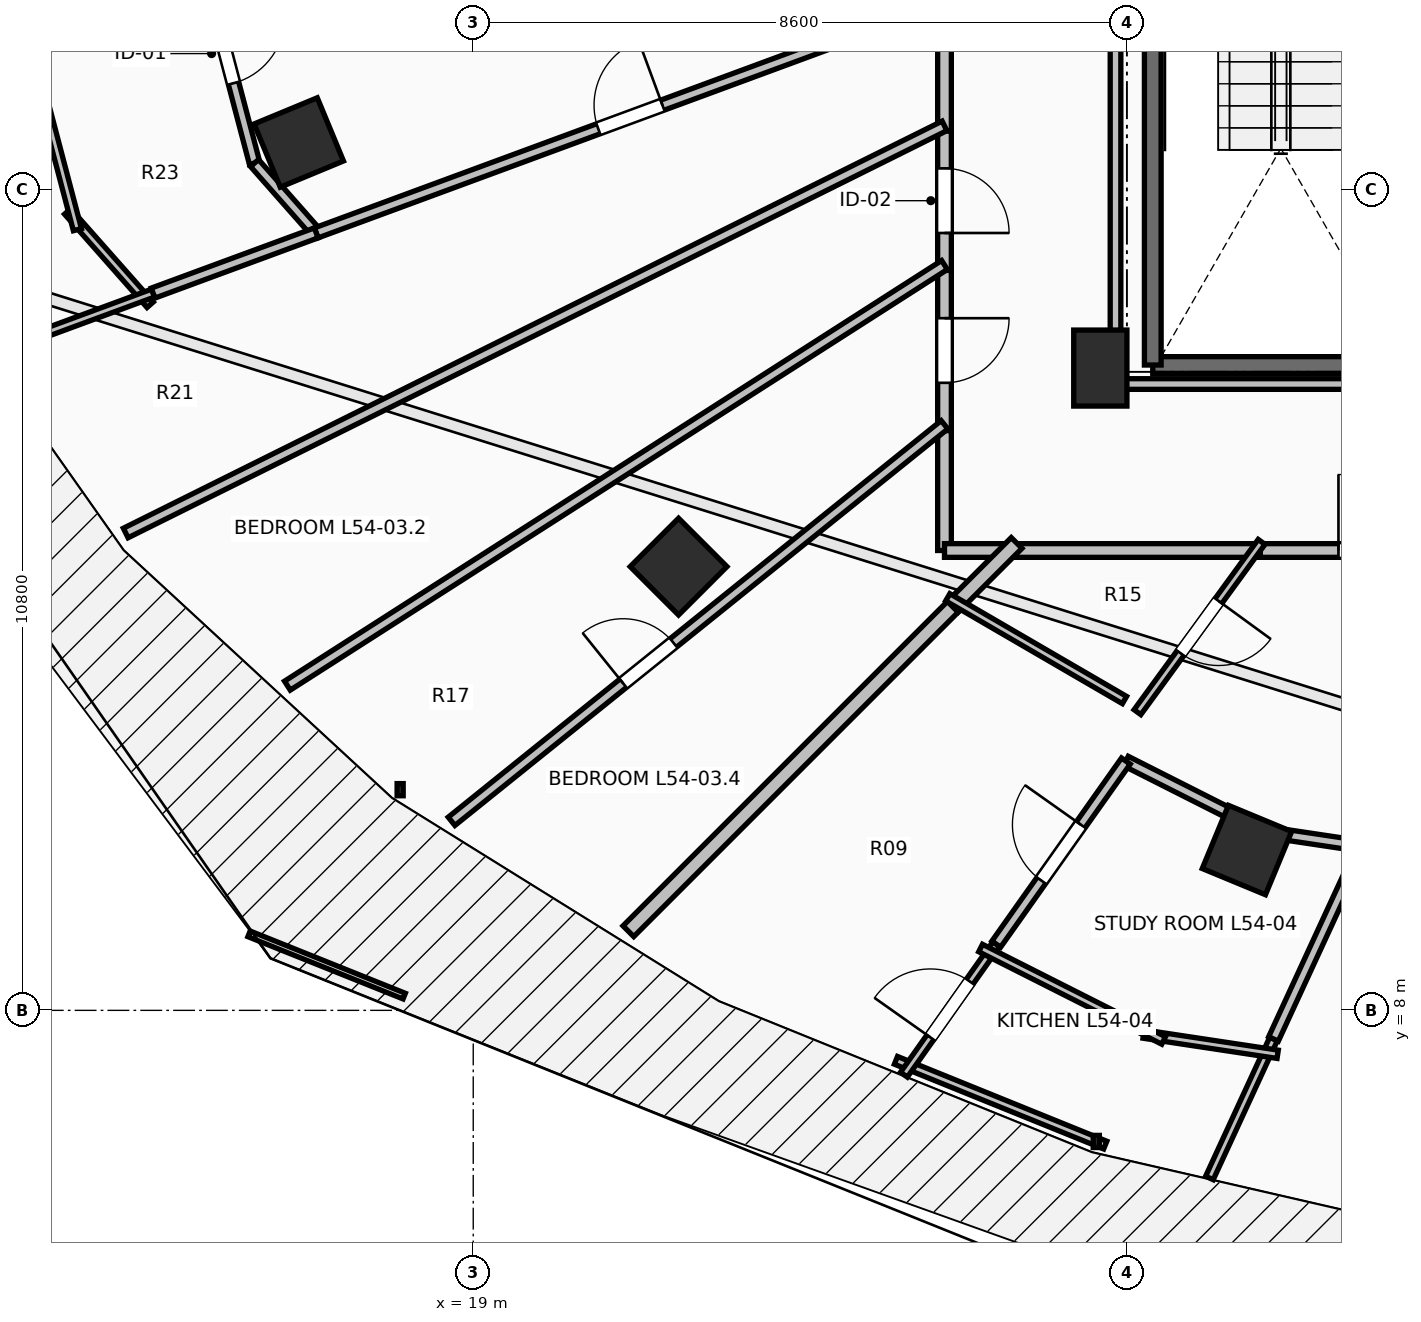
"""IFC4 building model, lengths in metres.
Left out: names, types, materials, properties, quantities, classifications, styles, units other than length and angle.
Written with IfcOpenShell. Run it as: python <this file> out.ifc"""

import sys

from ifc_helpers import new_model, si_unit, direction, frame, frame_2d, origin, origin_2d, place, context, subcontext, project, spatial, rectangle, extrude, element, fill, save


model = new_model("IFC4")
c1 = context("Model", 3, precision=1e-05, world=origin(), true_north=direction((0.0, 1.0)))
c2 = subcontext(c1, "Body", "Model", "MODEL_VIEW")
j1 = project(units=[si_unit("LENGTHUNIT", "METRE"), si_unit("PLANEANGLEUNIT", "RADIAN")], contexts=[c1])
p1 = place(None, origin())
s1 = spatial("IfcSite", under=j1, at=p1, CompositionType="ELEMENT")
p2 = place(p1, origin())
s2 = spatial("IfcBuilding", under=s1, at=p2, CompositionType="ELEMENT")
p3 = place(p2, frame((0.0, 0.0, 200.1)))
s3 = spatial("IfcBuildingStorey", under=s2, at=p3, CompositionType="ELEMENT", Elevation=200.1)
for number, where, z_axis, x_axis in (
    (1, (16.705, 19.418, 0.0), (0.0, 0.0, 1.0), (-0.924, -0.383, 0.0)),
    (2, (21.701, 13.838, 0.0), (0.0, 0.0, 1.0), (-0.707, -0.707, 0.0)),
    (3, (29.179, 10.109, 0.0), (0.0, 0.0, 1.0), (-0.383, -0.924, 0.0)),
):
    element("IfcColumn", number, at=place(p3, frame(where, z_axis=z_axis, x_axis=x_axis)), inside=s3, PredefinedType="COLUMN", context=c2, shape_type="SweptSolid", body=[
        extrude(rectangle(XDim=0.9, YDim=0.9, at=origin_2d()), origin(), (0.0, 0.0, 1.0), 3.55),
    ])
p4 = place(p3, frame((27.25, 16.45, 0.0), z_axis=(0.0, 0.0, 1.0), x_axis=(1.0, 0.0, 0.0)))
e4 = element("IfcColumn", 4, at=p4, inside=s3, PredefinedType="PILASTER", context=c2, shape_type="SweptSolid", body=[
    extrude(rectangle(XDim=0.7, YDim=1.0, at=origin_2d()), origin(), (0.0, 0.0, 1.0), 3.55),
])
p5 = place(p3, frame((31.31, 16.49, 0.0), z_axis=(0.0, 0.0, 1.0), x_axis=(-1.0, 0.0, 0.0)))
e5 = element("IfcWall", 5, at=p5, inside=s3, PredefinedType="SOLIDWALL", context=c2, shape_type="SweptSolid", body=[
    extrude(rectangle(XDim=3.37, YDim=0.22, at=frame_2d((1.685, 0.0))), origin(), (0.0, 0.0, 1.0), 3.29),
])
p6 = place(p3, frame((27.94, 16.49, 0.0), z_axis=(0.0, 0.0, 1.0), x_axis=(0.0, 1.0, 0.0)))
e6 = element("IfcWall", 6, at=p6, inside=s3, PredefinedType="SOLIDWALL", context=c2, shape_type="SweptSolid", body=[
    extrude(rectangle(XDim=7.42, YDim=0.22, at=frame_2d((3.71, 0.0))), origin(), (0.0, 0.0, 1.0), 3.29),
])
p7 = place(p3, frame((25.2, 21.214, 0.0), z_axis=(0.0, 0.0, 1.0), x_axis=(0.0, -1.0, 0.0)))
e7 = element("IfcWall", 7, at=p7, inside=s3, PredefinedType="PARTITIONING", context=c2, shape_type="SweptSolid", body=[
    extrude(rectangle(XDim=1.645, YDim=0.18, at=frame_2d((0.823, 0.0))), origin(), (0.0, 0.0, 1.0), 3.29),
])
p8 = place(p3, frame((25.2, 19.569, 0.0), z_axis=(0.0, 0.0, 1.0), x_axis=(0.0, -1.0, 0.0)))
e8 = element("IfcWall", 8, at=p8, inside=s3, PredefinedType="PARTITIONING", context=c2, shape_type="SweptSolid", body=[
    extrude(rectangle(XDim=1.834, YDim=0.18, at=frame_2d((0.917, 0.0))), origin(), (0.0, 0.0, 1.0), 3.29),
])
p9 = place(p8, frame((0.492, 0.0, 0.0)))
e9 = element("IfcOpeningElement", 9, at=p9, cuts=e8, PredefinedType="OPENING", context=c2, shape_type="SweptSolid", body=[
    extrude(rectangle(XDim=0.85, YDim=2.1, at=frame_2d((0.425, 1.05))), frame((0.0, 0.105, 0.0), z_axis=(0.0, -1.0, 0.0), x_axis=(1.0, 0.0, 0.0)), (0.0, 0.0, 1.0), 0.21),
])
p10 = place(p3, frame((25.2, 17.735, 0.0), z_axis=(0.0, 0.0, 1.0), x_axis=(0.0, -1.0, 0.0)))
e10 = element("IfcWall", 10, at=p10, inside=s3, PredefinedType="PARTITIONING", context=c2, shape_type="SweptSolid", body=[
    extrude(rectangle(XDim=2.108, YDim=0.18, at=frame_2d((1.054, 0.0))), origin(), (0.0, 0.0, 1.0), 2.482),
])
p11 = place(p10, frame((0.629, 0.0, 0.0)))
e11 = element("IfcOpeningElement", 11, at=p11, cuts=e10, PredefinedType="OPENING", context=c2, shape_type="SweptSolid", body=[
    extrude(rectangle(XDim=0.85, YDim=2.1, at=frame_2d((0.425, 1.05))), frame((0.0, 0.105, 0.0), z_axis=(0.0, -1.0, 0.0), x_axis=(1.0, 0.0, 0.0)), (0.0, 0.0, 1.0), 0.21),
])
p12 = place(p3, frame((25.2, 15.627, 0.0), z_axis=(0.0, 0.0, 1.0), x_axis=(0.0, -1.0, 0.0)))
e12 = element("IfcWall", 12, at=p12, inside=s3, PredefinedType="PARTITIONING", context=c2, shape_type="SweptSolid", body=[
    extrude(rectangle(XDim=1.577, YDim=0.18, at=frame_2d((0.789, 0.0))), origin(), (0.0, 0.0, 1.0), 2.482),
])
p13 = place(p3, frame((25.2, 14.05, 0.0), z_axis=(0.0, 0.0, 1.0), x_axis=(1.0, 0.0, 0.0)))
e13 = element("IfcWall", 13, at=p13, inside=s3, PredefinedType="PARTITIONING", context=c2, shape_type="SweptSolid", body=[
    extrude(rectangle(XDim=0.91, YDim=0.18, at=frame_2d((0.455, 0.0))), origin(), (0.0, 0.0, 1.0), 3.022),
])
p14 = place(p3, frame((29.215, 14.05, 0.0), z_axis=(0.0, 0.0, 1.0), x_axis=(1.0, 0.0, 0.0)))
e14 = element("IfcWall", 14, at=p14, inside=s3, PredefinedType="PARTITIONING", context=c2, shape_type="SweptSolid", body=[
    extrude(rectangle(XDim=3.336, YDim=0.18, at=frame_2d((1.668, 0.0))), origin(), (0.0, 0.0, 1.0), 2.936),
])
p15 = place(p14, frame((1.168, 0.0, 0.0)))
e15 = element("IfcOpeningElement", 15, at=p15, cuts=e14, PredefinedType="OPENING", context=c2, shape_type="SweptSolid", body=[
    extrude(rectangle(XDim=1.0, YDim=2.15, at=frame_2d((0.5, 1.075))), frame((0.0, 0.105, 0.0), z_axis=(0.0, -1.0, 0.0), x_axis=(1.0, 0.0, 0.0)), (0.0, 0.0, 1.0), 0.21),
])
p16 = place(p3, frame((25.97, 14.05, 0.0), z_axis=(0.0, 0.0, 1.0), x_axis=(1.0, 0.0, 0.0)))
e16 = element("IfcWall", 16, at=p16, inside=s3, PredefinedType="PARTITIONING", context=c2, shape_type="SweptSolid", body=[
    extrude(rectangle(XDim=3.385, YDim=0.18, at=frame_2d((1.692, 0.0))), origin(), (0.0, 0.0, 1.0), 2.482),
])
p17 = place(p3, frame((15.341, 22.119, 0.0), z_axis=(0.0, 0.0, 1.0), x_axis=(0.254462015144, -0.967082769389, 0.0)))
e17 = element("IfcWall", 17, at=p17, inside=s3, PredefinedType="PARTITIONING", context=c2, shape_type="SweptSolid", body=[
    extrude(rectangle(XDim=3.073, YDim=0.14, at=frame_2d((1.537, 0.0))), origin(), (0.0, 0.0, 1.0), 3.29),
])
p18 = place(p17, frame((1.087, 0.0, 0.0)))
e18 = element("IfcOpeningElement", 18, at=p18, cuts=e17, PredefinedType="OPENING", context=c2, shape_type="SweptSolid", body=[
    extrude(rectangle(XDim=0.9, YDim=2.1, at=frame_2d((0.45, 1.05))), frame((0.0, 0.085, 0.0), z_axis=(0.0, -1.0, 0.0), x_axis=(1.0, 0.0, 0.0)), (0.0, 0.0, 1.0), 0.17),
])
p19 = place(p3, frame((16.123, 19.147, 0.0), z_axis=(0.0, 0.0, 1.0), x_axis=(0.66171386468, -0.749756467988, 0.0)))
e19 = element("IfcWall", 19, at=p19, inside=s3, PredefinedType="PARTITIONING", context=c2, shape_type="SweptSolid", body=[
    extrude(rectangle(XDim=1.226, YDim=0.14, at=frame_2d((0.613, 0.0))), origin(), (0.0, 0.0, 1.0), 3.29),
])
p20 = place(p3, frame((16.934, 18.228, 0.0), z_axis=(0.0, 0.0, 1.0), x_axis=(0.938168899516, 0.34617786755, 0.0)))
e20 = element("IfcWall", 20, at=p20, inside=s3, PredefinedType="PARTITIONING", context=c2, shape_type="SweptSolid", body=[
    extrude(rectangle(XDim=8.811, YDim=0.14, at=frame_2d((4.405, 0.0))), origin(), (0.0, 0.0, 1.0), 2.482),
])
p21 = place(p20, frame((3.955, 0.0, 0.0)))
e21 = element("IfcOpeningElement", 21, at=p21, cuts=e20, PredefinedType="OPENING", context=c2, shape_type="SweptSolid", body=[
    extrude(rectangle(XDim=0.9, YDim=2.1, at=frame_2d((0.45, 1.05))), frame((0.0, 0.085, 0.0), z_axis=(0.0, -1.0, 0.0), x_axis=(1.0, 0.0, 0.0)), (0.0, 0.0, 1.0), 0.17),
])
p22 = place(p3, frame((14.75, 17.283, 0.0), z_axis=(0.0, 0.0, 1.0), x_axis=(-0.662345628205, 0.749198417509, 0.0)))
e22 = element("IfcWall", 22, at=p22, inside=s3, PredefinedType="PARTITIONING", context=c2, shape_type="SweptSolid", body=[
    extrude(rectangle(XDim=1.639, YDim=0.11, at=frame_2d((0.819, 0.0))), origin(), (0.0, 0.0, 1.0), 3.29),
])
p23 = place(p3, frame((13.792, 18.271, 0.0), z_axis=(0.0, 0.0, 1.0), x_axis=(-0.254271540361, 0.967132867688, 0.0)))
e23 = element("IfcWall", 23, at=p23, inside=s3, PredefinedType="PARTITIONING", context=c2, shape_type="SweptSolid", body=[
    extrude(rectangle(XDim=3.685, YDim=0.11, at=frame_2d((1.843, 0.0))), origin(), (0.0, 0.0, 1.0), 3.29),
])
p24 = place(p3, frame((12.604, 16.631, 0.0), z_axis=(0.0, 0.0, 1.0), x_axis=(0.938194450562, 0.346108614361, 0.0)))
e24 = element("IfcWall", 24, at=p24, inside=s3, PredefinedType="PARTITIONING", context=c2, shape_type="SweptSolid", body=[
    extrude(rectangle(XDim=2.328, YDim=0.11, at=frame_2d((1.164, 0.0))), origin(), (0.0, 0.0, 1.0), 3.29),
])
p25 = place(p3, frame((14.788, 17.436, 0.0), z_axis=(0.0, 0.0, 1.0), x_axis=(0.938171690747, 0.346170303003, 0.0)))
e25 = element("IfcWall", 25, at=p25, inside=s3, PredefinedType="PARTITIONING", context=c2, shape_type="SweptSolid", body=[
    extrude(rectangle(XDim=2.287, YDim=0.14, at=frame_2d((1.144, 0.0))), origin(), (0.0, 0.0, 1.0), 3.29),
])
p26 = place(p3, frame((14.428, 14.28, 0.0), z_axis=(0.0, 0.0, 1.0), x_axis=(0.895423439435, 0.44521552546, 0.0)))
e26 = element("IfcWall", 26, at=p26, inside=s3, PredefinedType="PARTITIONING", context=c2, shape_type="SweptSolid", body=[
    extrude(rectangle(XDim=12.03, YDim=0.14, at=frame_2d((6.015, 0.0))), origin(), (0.0, 0.0, 1.0), 2.482),
])
p27 = place(p3, frame((16.555, 12.272, 0.0), z_axis=(0.0, 0.0, 1.0), x_axis=(0.842221721565, 0.539131312135, 0.0)))
e27 = element("IfcWall", 27, at=p27, inside=s3, PredefinedType="PARTITIONING", context=c2, shape_type="SweptSolid", body=[
    extrude(rectangle(XDim=10.265, YDim=0.14, at=frame_2d((5.132, 0.0))), origin(), (0.0, 0.0, 1.0), 2.482),
])
p28 = place(p3, frame((18.715, 10.487, 0.0), z_axis=(0.0, 0.0, 1.0), x_axis=(0.779157389419, 0.626828335762, 0.0)))
e28 = element("IfcWall", 28, at=p28, inside=s3, PredefinedType="PARTITIONING", context=c2, shape_type="SweptSolid", body=[
    extrude(rectangle(XDim=8.323, YDim=0.14, at=frame_2d((4.162, 0.0))), origin(), (0.0, 0.0, 1.0), 2.482),
])
p29 = place(p28, frame((2.896, 0.0, 0.0)))
e29 = element("IfcOpeningElement", 29, at=p29, cuts=e28, PredefinedType="OPENING", context=c2, shape_type="SweptSolid", body=[
    extrude(rectangle(XDim=0.85, YDim=2.1, at=frame_2d((0.425, 1.05))), frame((0.0, 0.085, 0.0), z_axis=(0.0, -1.0, 0.0), x_axis=(1.0, 0.0, 0.0)), (0.0, 0.0, 1.0), 0.17),
])
p30 = place(p3, frame((21.041, 9.041, 0.0), z_axis=(0.0, 0.0, 1.0), x_axis=(0.707106781187, 0.707106781187, 0.0)))
e30 = element("IfcWall", 30, at=p30, inside=s3, PredefinedType="PARTITIONING", context=c2, shape_type="SweptSolid", body=[
    extrude(rectangle(XDim=6.176, YDim=0.2, at=frame_2d((3.088, 0.0))), origin(), (0.0, 0.0, 1.0), 2.824),
])
p31 = place(p3, frame((25.309, 13.309, 0.0), z_axis=(0.0, 0.0, 1.0), x_axis=(0.707106781187, 0.707106781187, 0.0)))
e31 = element("IfcWall", 31, at=p31, inside=s3, PredefinedType="PARTITIONING", context=c2, shape_type="SweptSolid", body=[
    extrude(rectangle(XDim=1.188, YDim=0.2, at=frame_2d((0.594, 0.0))), origin(), (0.0, 0.0, 1.0), 3.022),
])
p32 = place(p3, frame((29.372, 14.163, 0.0), z_axis=(0.0, 0.0, 1.0), x_axis=(-0.589066743954, -0.808084383693, 0.0)))
e32 = element("IfcWall", 32, at=p32, inside=s3, PredefinedType="PARTITIONING", context=c2, shape_type="SweptSolid", body=[
    extrude(rectangle(XDim=2.772, YDim=0.11, at=frame_2d((1.386, 0.0))), origin(), (0.0, 0.0, 1.0), 2.482),
])
p33 = place(p32, frame((0.961, 0.0, 0.0)))
e33 = element("IfcOpeningElement", 33, at=p33, cuts=e32, PredefinedType="OPENING", context=c2, shape_type="SweptSolid", body=[
    extrude(rectangle(XDim=0.85, YDim=2.1, at=frame_2d((0.425, 1.05))), frame((0.0, 0.07, 0.0), z_axis=(0.0, -1.0, 0.0), x_axis=(1.0, 0.0, 0.0)), (0.0, 0.0, 1.0), 0.14),
])
p34 = place(p3, frame((27.568, 12.083, 0.0), z_axis=(0.0, 0.0, 1.0), x_axis=(-0.864515441931, 0.502606258082, 0.0)))
e34 = element("IfcWall", 34, at=p34, inside=s3, PredefinedType="PARTITIONING", context=c2, shape_type="SweptSolid", body=[
    extrude(rectangle(XDim=2.69, YDim=0.11, at=frame_2d((1.345, 0.0))), origin(), (0.0, 0.0, 1.0), 3.29),
])
p35 = place(p3, frame((29.529, 7.624, 0.0), z_axis=(0.0, 0.0, 1.0), x_axis=(-0.418673802252, -0.908136689771, 0.0)))
e35 = element("IfcWall", 35, at=p35, inside=s3, PredefinedType="PARTITIONING", context=c2, shape_type="SweptSolid", body=[
    extrude(rectangle(XDim=2.014, YDim=0.11, at=frame_2d((1.007, 0.0))), origin(), (0.0, 0.0, 1.0), 3.29),
])
p36 = place(p3, frame((24.561, 7.343, 0.0), z_axis=(0.0, 0.0, 1.0), x_axis=(0.926858319785, -0.375411314487, 0.0)))
e36 = element("IfcWall", 36, at=p36, inside=s3, PredefinedType="PARTITIONING", context=c2, shape_type="SweptSolid", body=[
    extrude(rectangle(XDim=2.971, YDim=0.11, at=frame_2d((1.485, 0.0))), origin(), (0.0, 0.0, 1.0), 3.29),
])
p37 = place(p3, frame((24.666, 7.154, 0.0), z_axis=(0.0, 0.0, 1.0), x_axis=(0.577389248155, 0.816469017241, 0.0)))
e37 = element("IfcWall", 37, at=p37, inside=s3, PredefinedType="PARTITIONING", context=c2, shape_type="SweptSolid", body=[
    extrude(rectangle(XDim=2.104, YDim=0.11, at=frame_2d((1.052, 0.0))), origin(), (0.0, 0.0, 1.0), 3.29),
])
p38 = place(p37, frame((0.602, 0.0, 0.0)))
e38 = element("IfcOpeningElement", 38, at=p38, cuts=e37, PredefinedType="OPENING", context=c2, shape_type="SweptSolid", body=[
    extrude(rectangle(XDim=0.9, YDim=2.1, at=frame_2d((0.45, 1.05))), frame((0.0, 0.07, 0.0), z_axis=(0.0, -1.0, 0.0), x_axis=(1.0, 0.0, 0.0)), (0.0, 0.0, 1.0), 0.14),
])
p39 = place(p3, frame((27.586, 11.28, 0.0), z_axis=(0.0, 0.0, 1.0), x_axis=(0.89250267167, -0.451042105643, 0.0)))
e39 = element("IfcWall", 39, at=p39, inside=s3, PredefinedType="PARTITIONING", context=c2, shape_type="SweptSolid", body=[
    extrude(rectangle(XDim=2.064, YDim=0.14, at=frame_2d((1.032, 0.0))), origin(), (0.0, 0.0, 1.0), 2.482),
])
p40 = place(p3, frame((29.428, 10.349, 0.0), z_axis=(0.0, 0.0, 1.0), x_axis=(0.988955881685, -0.148210202353, 0.0)))
e40 = element("IfcWall", 40, at=p40, inside=s3, PredefinedType="PARTITIONING", context=c2, shape_type="SweptSolid", body=[
    extrude(rectangle(XDim=1.283, YDim=0.14, at=frame_2d((0.642, 0.0))), origin(), (0.0, 0.0, 1.0), 3.29),
])
p41 = place(p3, frame((30.697, 10.159, 0.0), z_axis=(0.0, 0.0, 1.0), x_axis=(-0.41861439522, -0.908164075547, 0.0)))
e41 = element("IfcWall", 41, at=p41, inside=s3, PredefinedType="PARTITIONING", context=c2, shape_type="SweptSolid", body=[
    extrude(rectangle(XDim=2.791, YDim=0.14, at=frame_2d((1.396, 0.0))), origin(), (0.0, 0.0, 1.0), 2.824),
])
p42 = place(p3, frame((25.881, 8.871, 0.0), z_axis=(0.0, 0.0, 1.0), x_axis=(0.577734997211, 0.816224401128, 0.0)))
e42 = element("IfcWall", 42, at=p42, inside=s3, PredefinedType="PARTITIONING", context=c2, shape_type="SweptSolid", body=[
    extrude(rectangle(XDim=2.951, YDim=0.14, at=frame_2d((1.476, 0.0))), origin(), (0.0, 0.0, 1.0), 2.824),
])
p43 = place(p42, frame((1.026, 0.0, 0.0)))
e43 = element("IfcOpeningElement", 43, at=p43, cuts=e42, PredefinedType="OPENING", context=c2, shape_type="SweptSolid", body=[
    extrude(rectangle(XDim=0.9, YDim=2.1, at=frame_2d((0.45, 1.05))), frame((0.0, 0.085, 0.0), z_axis=(0.0, -1.0, 0.0), x_axis=(1.0, 0.0, 0.0)), (0.0, 0.0, 1.0), 0.17),
])
p44 = place(p3, frame((29.583, 7.422, 0.0), z_axis=(0.0, 0.0, 1.0), x_axis=(-0.988830695744, 0.149043131857, 0.0)))
e44 = element("IfcWall", 44, at=p44, inside=s3, PredefinedType="PARTITIONING", context=c2, shape_type="SweptSolid", body=[
    extrude(rectangle(XDim=1.784, YDim=0.11, at=frame_2d((0.892, 0.0))), origin(), (0.0, 0.0, 1.0), 3.29),
])
p45 = place(p3, frame((28.083, 7.604, 0.0), z_axis=(0.0, 0.0, 1.0), x_axis=(-0.892628057427, 0.450793911999, 0.0)))
e45 = element("IfcWall", 45, at=p45, inside=s3, PredefinedType="PARTITIONING", context=c2, shape_type="SweptSolid", body=[
    extrude(rectangle(XDim=2.698, YDim=0.11, at=frame_2d((1.349, 0.0))), origin(), (0.0, 0.0, 1.0), 3.29),
])
p46 = place(p3, frame((27.45, 23.754, 0.0), z_axis=(0.0, 0.0, 1.0), x_axis=(0.0, -1.0, 0.0)))
e46 = element("IfcWall", 46, at=p46, inside=s3, PredefinedType="PARTITIONING", context=c2, shape_type="SweptSolid", body=[
    extrude(rectangle(XDim=7.514, YDim=0.14, at=frame_2d((3.757, 0.0))), origin(), (0.0, 0.0, 1.0), 2.482),
])
p47 = place(p3, frame((27.45, 16.24, 0.0), z_axis=(0.0, 0.0, 1.0), x_axis=(1.0, 0.0, 0.0)))
e47 = element("IfcWall", 47, at=p47, inside=s3, PredefinedType="PARTITIONING", context=c2, shape_type="SweptSolid", body=[
    extrude(rectangle(XDim=3.745, YDim=0.14, at=frame_2d((1.873, 0.0))), origin(), (0.0, 0.0, 1.0), 2.482),
])
p48 = place(p15, origin())
e48 = element("IfcDoor", 48, at=p48, inside=s3, OperationType="SINGLE_SWING_LEFT", PredefinedType="DOOR", context=c2, shape_type="SweptSolid", body=[
    extrude(rectangle(XDim=1.0, YDim=2.15, at=frame_2d((0.5, 1.075))), frame((0.0, 0.025, 0.0), z_axis=(0.0, -1.0, 0.0), x_axis=(1.0, 0.0, 0.0)), (0.0, 0.0, 1.0), 0.05),
])
fill(e15, e48)
p49 = place(p18, origin())
e49 = element("IfcDoor", 49, at=p49, inside=s3, OperationType="SINGLE_SWING_LEFT", PredefinedType="DOOR", context=c2, shape_type="SweptSolid", body=[
    extrude(rectangle(XDim=0.9, YDim=2.1, at=frame_2d((0.45, 1.05))), frame((0.0, 0.025, 0.0), z_axis=(0.0, -1.0, 0.0), x_axis=(1.0, 0.0, 0.0)), (0.0, 0.0, 1.0), 0.05),
])
fill(e18, e49)
p50 = place(p21, origin())
e50 = element("IfcDoor", 50, at=p50, inside=s3, OperationType="SINGLE_SWING_RIGHT", PredefinedType="DOOR", context=c2, shape_type="SweptSolid", body=[
    extrude(rectangle(XDim=0.9, YDim=2.1, at=frame_2d((0.45, 1.05))), frame((0.0, 0.025, 0.0), z_axis=(0.0, -1.0, 0.0), x_axis=(1.0, 0.0, 0.0)), (0.0, 0.0, 1.0), 0.05),
])
fill(e21, e50)
p51 = place(p33, origin())
e51 = element("IfcDoor", 51, at=p51, inside=s3, OperationType="SINGLE_SWING_LEFT", PredefinedType="DOOR", context=c2, shape_type="SweptSolid", body=[
    extrude(rectangle(XDim=0.85, YDim=2.1, at=frame_2d((0.425, 1.05))), frame((0.0, 0.025, 0.0), z_axis=(0.0, -1.0, 0.0), x_axis=(1.0, 0.0, 0.0)), (0.0, 0.0, 1.0), 0.05),
])
fill(e33, e51)
p52 = place(p38, origin())
e52 = element("IfcDoor", 52, at=p52, inside=s3, OperationType="SINGLE_SWING_LEFT", PredefinedType="DOOR", context=c2, shape_type="SweptSolid", body=[
    extrude(rectangle(XDim=0.9, YDim=2.1, at=frame_2d((0.45, 1.05))), frame((0.0, 0.025, 0.0), z_axis=(0.0, -1.0, 0.0), x_axis=(1.0, 0.0, 0.0)), (0.0, 0.0, 1.0), 0.05),
])
fill(e38, e52)
p53 = place(p43, origin())
e53 = element("IfcDoor", 53, at=p53, inside=s3, OperationType="SINGLE_SWING_RIGHT", PredefinedType="DOOR", context=c2, shape_type="SweptSolid", body=[
    extrude(rectangle(XDim=0.9, YDim=2.1, at=frame_2d((0.45, 1.05))), frame((0.0, 0.025, 0.0), z_axis=(0.0, -1.0, 0.0), x_axis=(1.0, 0.0, 0.0)), (0.0, 0.0, 1.0), 0.05),
])
fill(e43, e53)
p54 = place(p9, origin())
e54 = element("IfcDoor", 54, at=p54, inside=s3, OperationType="SINGLE_SWING_RIGHT", PredefinedType="DOOR", context=c2, shape_type="SweptSolid", body=[
    extrude(rectangle(XDim=0.85, YDim=2.1, at=frame_2d((0.425, 1.05))), frame((0.0, 0.025, 0.0), z_axis=(0.0, -1.0, 0.0), x_axis=(1.0, 0.0, 0.0)), (0.0, 0.0, 1.0), 0.05),
])
fill(e9, e54)
p55 = place(p11, origin())
e55 = element("IfcDoor", 55, at=p55, inside=s3, OperationType="SINGLE_SWING_LEFT", PredefinedType="DOOR", context=c2, shape_type="SweptSolid", body=[
    extrude(rectangle(XDim=0.85, YDim=2.1, at=frame_2d((0.425, 1.05))), frame((0.0, 0.025, 0.0), z_axis=(0.0, -1.0, 0.0), x_axis=(1.0, 0.0, 0.0)), (0.0, 0.0, 1.0), 0.05),
])
fill(e11, e55)
p56 = place(p29, origin())
e56 = element("IfcDoor", 56, at=p56, inside=s3, OperationType="SINGLE_SWING_LEFT", PredefinedType="DOOR", context=c2, shape_type="SweptSolid", body=[
    extrude(rectangle(XDim=0.85, YDim=2.1, at=frame_2d((0.425, 1.05))), frame((0.0, 0.025, 0.0), z_axis=(0.0, -1.0, 0.0), x_axis=(1.0, 0.0, 0.0)), (0.0, 0.0, 1.0), 0.05),
])
fill(e29, e56)
save(model, sys.argv[1])
